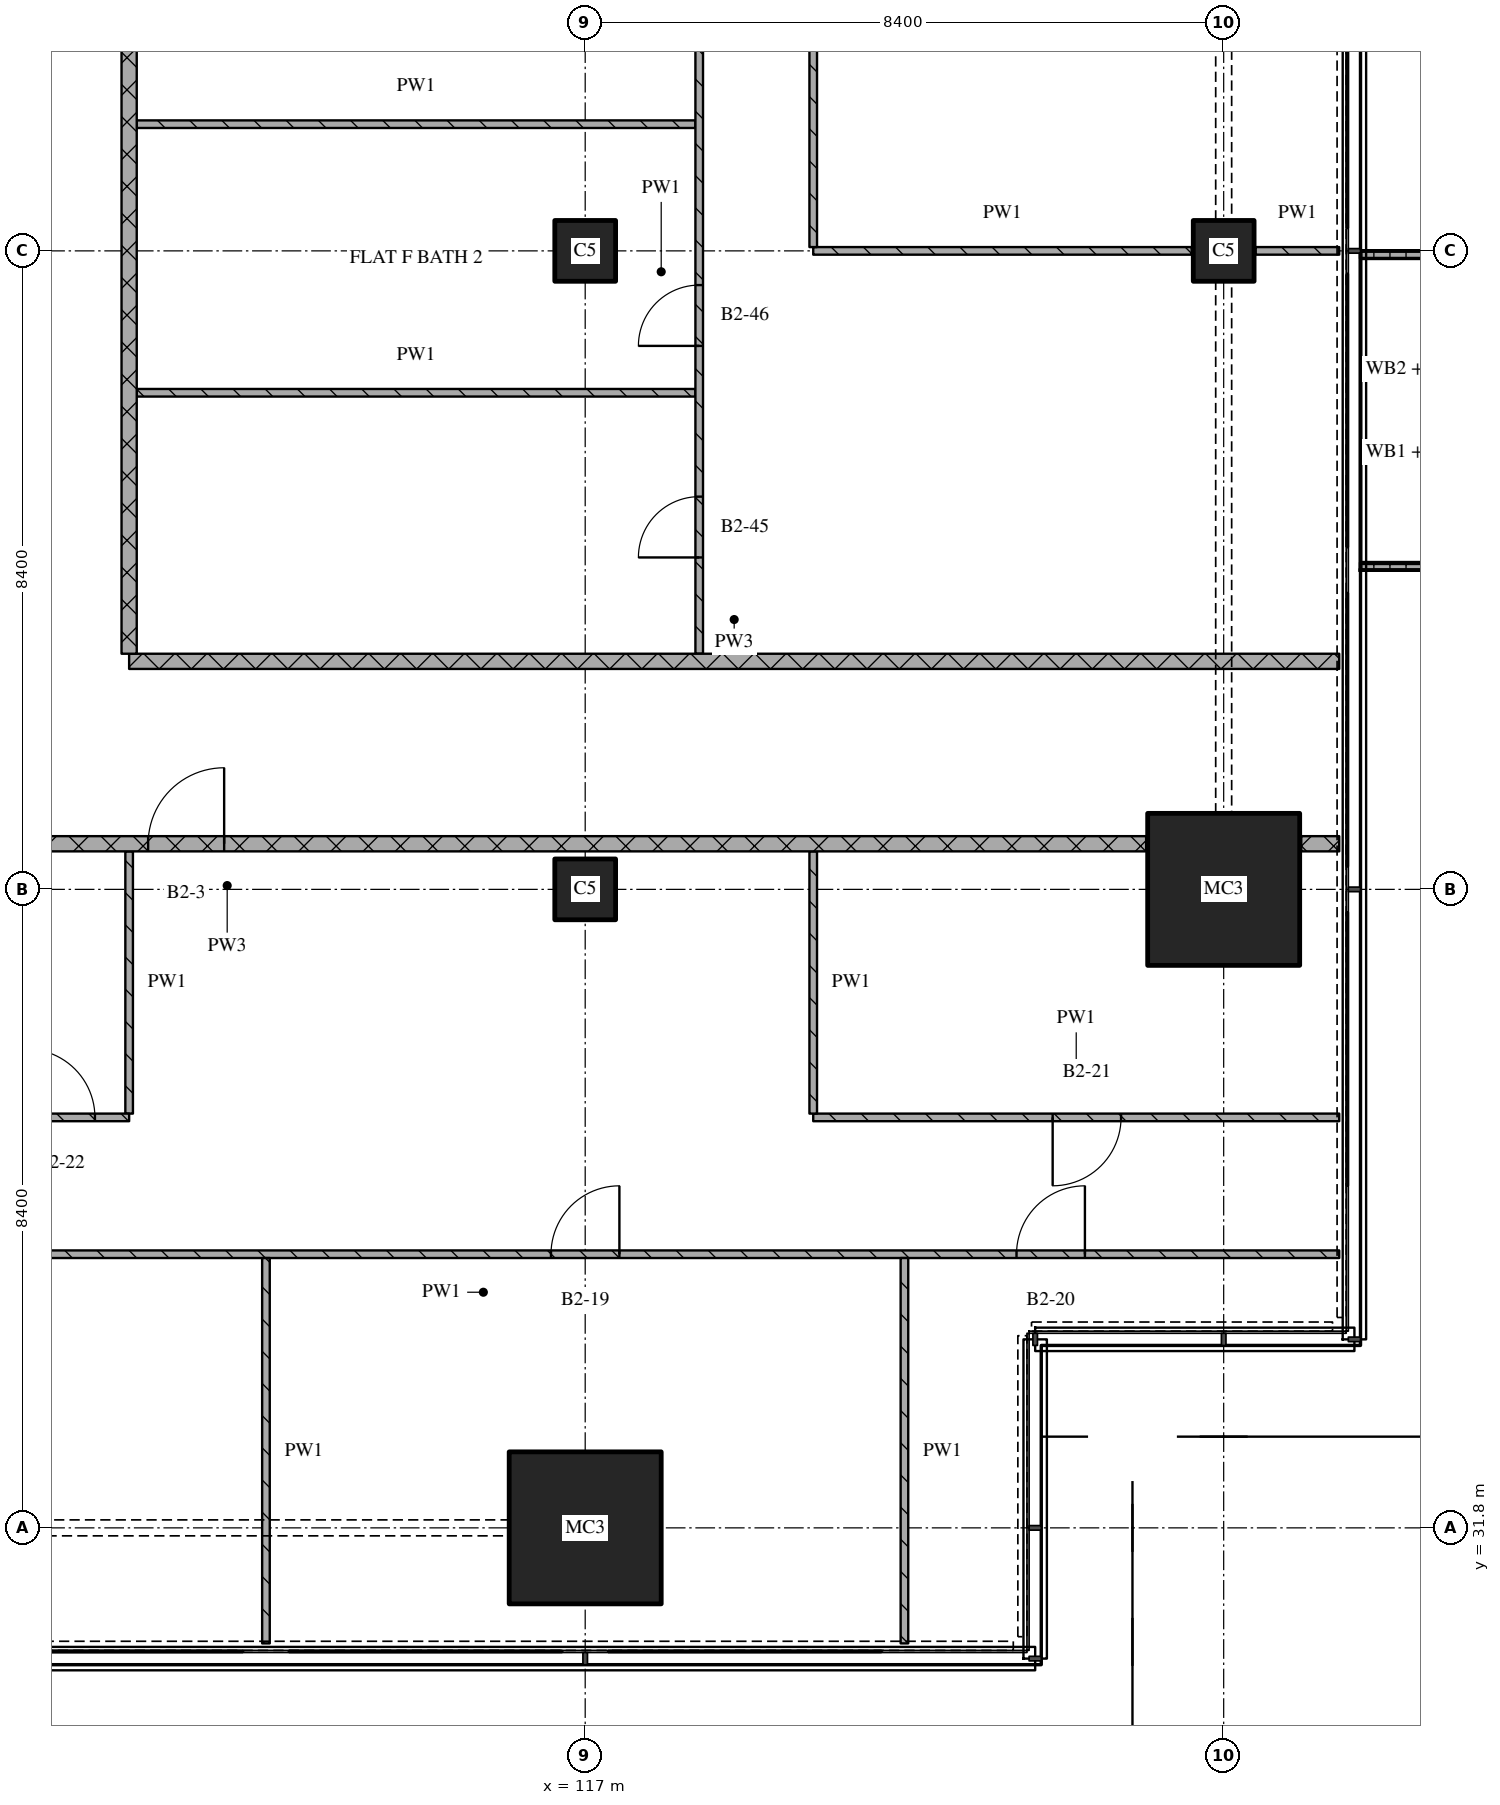
"""IFC4 building model, lengths in metres.
Left out: names, types, materials, properties, quantities, classifications, styles, units other than length and angle.
Written with IfcOpenShell. Run it as: python <this file> out.ifc"""

import sys

from ifc_helpers import new_model, si_unit, direction, frame, frame_2d, origin, origin_2d, place, context, subcontext, project, spatial, polyline, rectangle, outline, extrude, element, fill, save


model = new_model("IFC4")
c1 = context("Model", 3, precision=1e-05, world=origin(), true_north=direction((0.0, 1.0)))
c2 = subcontext(c1, "Body", "Model", "MODEL_VIEW")
j1 = project(units=[si_unit("LENGTHUNIT", "METRE"), si_unit("PLANEANGLEUNIT", "RADIAN")], contexts=[c1])
p1 = place(None, origin())
s1 = spatial("IfcSite", under=j1, at=p1, CompositionType="ELEMENT")
p2 = place(p1, origin())
s2 = spatial("IfcBuilding", under=s1, at=p2, CompositionType="ELEMENT")
p3 = place(p2, frame((0.0, 0.0, 106.05)))
s3 = spatial("IfcBuildingStorey", under=s2, at=p3, CompositionType="ELEMENT", Elevation=106.05)
p4 = place(p3, frame((117.0, 31.8, 0.0), z_axis=(0.0, 0.0, 1.0), x_axis=(1.0, 0.0, 0.0)))
e1 = element("IfcColumn", 1, at=p4, inside=s3, PredefinedType="COLUMN", context=c2, shape_type="SweptSolid", body=[
    extrude(rectangle(XDim=2.0, YDim=2.0, at=origin_2d()), origin(), (0.0, 0.0, 1.0), 3.6),
])
for number, where, z_axis, x_axis in (
    (2, (117.0, 40.2, 0.0), (0.0, 0.0, 1.0), (1.0, 0.0, 0.0)),
    (3, (117.0, 48.6, 0.0), (0.0, 0.0, 1.0), (1.0, 0.0, 0.0)),
):
    element("IfcColumn", number, at=place(p3, frame(where, z_axis=z_axis, x_axis=x_axis)), inside=s3, PredefinedType="COLUMN", context=c2, shape_type="SweptSolid", body=[
        extrude(rectangle(XDim=0.8, YDim=0.8, at=origin_2d()), origin(), (0.0, 0.0, 1.0), 3.6),
    ])
p5 = place(p3, frame((125.4, 40.2, 0.0), z_axis=(0.0, 0.0, 1.0), x_axis=(1.0, 0.0, 0.0)))
e4 = element("IfcColumn", 4, at=p5, inside=s3, PredefinedType="COLUMN", context=c2, shape_type="SweptSolid", body=[
    extrude(rectangle(XDim=2.0, YDim=2.0, at=origin_2d()), origin(), (0.0, 0.0, 1.0), 3.6),
])
p6 = place(p3, frame((125.4, 48.6, 0.0), z_axis=(0.0, 0.0, 1.0), x_axis=(1.0, 0.0, 0.0)))
e5 = element("IfcColumn", 5, at=p6, inside=s3, PredefinedType="COLUMN", context=c2, shape_type="SweptSolid", body=[
    extrude(rectangle(XDim=0.8, YDim=0.8, at=origin_2d()), origin(), (0.0, 0.0, 1.0), 3.6),
])
p7 = place(p3, origin())
e6 = element("IfcWall", 6, at=p7, inside=s3, PredefinedType="SOLIDWALL", context=c2, shape_type="SweptSolid", body=[
    extrude(outline(polyline([(127.2, 44.4), (127.2, 44.5), (128.833, 44.5), (128.833, 48.5), (127.2, 48.5), (127.2, 48.6), (128.933, 48.6), (128.933, 44.4), (127.2, 44.4)])), origin(), (0.0, 0.0, 1.0), 1.0),
])
p8 = place(p3, frame((126.92, 35.4, 0.0), z_axis=(0.0, 0.0, 1.0), x_axis=(-1.0, 0.0, 0.0)))
e7 = element("IfcWall", 7, at=p8, inside=s3, PredefinedType="PARTITIONING", context=c2, shape_type="SweptSolid", body=[
    extrude(rectangle(XDim=22.52, YDim=0.1, at=frame_2d((11.26, 0.0))), origin(), (0.0, 0.0, 1.0), 3.32),
])
p9 = place(p8, frame((3.346, 0.0, 0.0)))
e8 = element("IfcOpeningElement", 8, at=p9, cuts=e7, PredefinedType="OPENING", context=c2, shape_type="SweptSolid", body=[
    extrude(rectangle(XDim=0.9, YDim=2.1, at=frame_2d((0.45, 1.05))), frame((0.0, 0.06, 0.0), z_axis=(0.0, -1.0, 0.0), x_axis=(1.0, 0.0, 0.0)), (0.0, 0.0, 1.0), 0.12),
])
p10 = place(p8, frame((9.47, 0.0, 0.0)))
e9 = element("IfcOpeningElement", 9, at=p10, cuts=e7, PredefinedType="OPENING", context=c2, shape_type="SweptSolid", body=[
    extrude(rectangle(XDim=0.9, YDim=2.1, at=frame_2d((0.45, 1.05))), frame((0.0, 0.06, 0.0), z_axis=(0.0, -1.0, 0.0), x_axis=(1.0, 0.0, 0.0)), (0.0, 0.0, 1.0), 0.12),
])
p11 = place(p8, frame((17.87, 0.0, 0.0)))
e10 = element("IfcOpeningElement", 10, at=p11, cuts=e7, PredefinedType="OPENING", context=c2, shape_type="SweptSolid", body=[
    extrude(rectangle(XDim=0.9, YDim=2.1, at=frame_2d((0.45, 1.05))), frame((0.0, 0.06, 0.0), z_axis=(0.0, -1.0, 0.0), x_axis=(1.0, 0.0, 0.0)), (0.0, 0.0, 1.0), 0.12),
])
p12 = place(p3, frame((120.0, 37.2, 0.0), z_axis=(0.0, 0.0, 1.0), x_axis=(1.0, 0.0, 0.0)))
e11 = element("IfcWall", 11, at=p12, inside=s3, PredefinedType="PARTITIONING", context=c2, shape_type="SweptSolid", body=[
    extrude(rectangle(XDim=6.92, YDim=0.1, at=frame_2d((3.46, 0.0))), origin(), (0.0, 0.0, 1.0), 3.32),
])
p13 = place(p12, frame((3.15, 0.0, 0.0)))
e12 = element("IfcOpeningElement", 12, at=p13, cuts=e11, PredefinedType="OPENING", context=c2, shape_type="SweptSolid", body=[
    extrude(rectangle(XDim=0.9, YDim=2.1, at=frame_2d((0.45, 1.05))), frame((0.0, 0.06, 0.0), z_axis=(0.0, -1.0, 0.0), x_axis=(1.0, 0.0, 0.0)), (0.0, 0.0, 1.0), 0.12),
])
p14 = place(p3, frame((124.38, 40.8, 0.0), z_axis=(0.0, 0.0, 1.0), x_axis=(-1.0, 0.0, 0.0)))
e13 = element("IfcWall", 13, at=p14, inside=s3, PredefinedType="PARTITIONING", context=c2, shape_type="SweptSolid", body=[
    extrude(rectangle(XDim=24.18, YDim=0.2, at=frame_2d((12.09, 0.0))), origin(), (0.0, 0.0, 1.0), 3.32),
])
p15 = place(p14, frame((12.13, 0.0, 0.0)))
e14 = element("IfcOpeningElement", 14, at=p15, cuts=e13, PredefinedType="OPENING", context=c2, shape_type="SweptSolid", body=[
    extrude(rectangle(XDim=1.0, YDim=2.1, at=frame_2d((0.5, 1.05))), frame((0.0, 0.11, 0.0), z_axis=(0.0, -1.0, 0.0), x_axis=(1.0, 0.0, 0.0)), (0.0, 0.0, 1.0), 0.22),
])
p16 = place(p3, frame((126.42, 40.8, 0.0), z_axis=(0.0, 0.0, 1.0), x_axis=(1.0, 0.0, 0.0)))
e15 = element("IfcWall", 15, at=p16, inside=s3, PredefinedType="PARTITIONING", context=c2, shape_type="SweptSolid", body=[
    extrude(rectangle(XDim=0.5, YDim=0.2, at=frame_2d((0.25, 0.0))), origin(), (0.0, 0.0, 1.0), 3.32),
])
p17 = place(p3, frame((111.0, 43.2, 0.0), z_axis=(0.0, 0.0, 1.0), x_axis=(1.0, 0.0, 0.0)))
e16 = element("IfcWall", 16, at=p17, inside=s3, PredefinedType="PARTITIONING", context=c2, shape_type="SweptSolid", body=[
    extrude(rectangle(XDim=15.92, YDim=0.2, at=frame_2d((7.96, 0.0))), origin(), (0.0, 0.0, 1.0), 3.32),
])
p18 = place(p3, frame((111.1, 46.733, 0.0), z_axis=(0.0, 0.0, 1.0), x_axis=(1.0, 0.0, 0.0)))
e17 = element("IfcWall", 17, at=p18, inside=s3, PredefinedType="PARTITIONING", context=c2, shape_type="SweptSolid", body=[
    extrude(rectangle(XDim=7.35, YDim=0.1, at=frame_2d((3.675, 0.0))), origin(), (0.0, 0.0, 1.0), 3.32),
])
p19 = place(p3, frame((120.0, 48.6, 0.0), z_axis=(0.0, 0.0, 1.0), x_axis=(1.0, 0.0, 0.0)))
e18 = element("IfcWall", 18, at=p19, inside=s3, PredefinedType="PARTITIONING", context=c2, shape_type="SweptSolid", body=[
    extrude(rectangle(XDim=4.98, YDim=0.1, at=frame_2d((2.49, 0.0))), origin(), (0.0, 0.0, 1.0), 3.32),
])
p20 = place(p3, frame((125.82, 48.6, 0.0), z_axis=(0.0, 0.0, 1.0), x_axis=(1.0, 0.0, 0.0)))
e19 = element("IfcWall", 19, at=p20, inside=s3, PredefinedType="PARTITIONING", context=c2, shape_type="SweptSolid", body=[
    extrude(rectangle(XDim=1.1, YDim=0.1, at=frame_2d((0.55, 0.0))), origin(), (0.0, 0.0, 1.0), 3.32),
])
p21 = place(p3, frame((111.1, 50.267, 0.0), z_axis=(0.0, 0.0, 1.0), x_axis=(1.0, 0.0, 0.0)))
e20 = element("IfcWall", 20, at=p21, inside=s3, PredefinedType="PARTITIONING", context=c2, shape_type="SweptSolid", body=[
    extrude(rectangle(XDim=7.35, YDim=0.1, at=frame_2d((3.675, 0.0))), origin(), (0.0, 0.0, 1.0), 3.32),
])
p22 = place(p3, frame((111.0, 75.32, 0.0), z_axis=(0.0, 0.0, 1.0), x_axis=(0.0, -1.0, 0.0)))
e21 = element("IfcWall", 21, at=p22, inside=s3, PredefinedType="PARTITIONING", context=c2, shape_type="SweptSolid", body=[
    extrude(rectangle(XDim=32.02, YDim=0.2, at=frame_2d((16.01, 0.0))), origin(), (0.0, 0.0, 1.0), 3.32),
])
p23 = place(p22, frame((3.87, 0.0, 0.0)))
e22 = element("IfcOpeningElement", 22, at=p23, cuts=e21, PredefinedType="OPENING", context=c2, shape_type="SweptSolid", body=[
    extrude(rectangle(XDim=1.0, YDim=2.1, at=frame_2d((0.5, 1.05))), frame((0.0, 0.11, 0.0), z_axis=(0.0, -1.0, 0.0), x_axis=(1.0, 0.0, 0.0)), (0.0, 0.0, 1.0), 0.22),
])
p24 = place(p22, frame((20.67, 0.0, 0.0)))
e23 = element("IfcOpeningElement", 23, at=p24, cuts=e21, PredefinedType="OPENING", context=c2, shape_type="SweptSolid", body=[
    extrude(rectangle(XDim=1.0, YDim=2.1, at=frame_2d((0.5, 1.05))), frame((0.0, 0.11, 0.0), z_axis=(0.0, -1.0, 0.0), x_axis=(1.0, 0.0, 0.0)), (0.0, 0.0, 1.0), 0.22),
])
p25 = place(p3, frame((111.0, 40.7, 0.0), z_axis=(0.0, 0.0, 1.0), x_axis=(0.0, -1.0, 0.0)))
e24 = element("IfcWall", 24, at=p25, inside=s3, PredefinedType="PARTITIONING", context=c2, shape_type="SweptSolid", body=[
    extrude(rectangle(XDim=3.45, YDim=0.1, at=frame_2d((1.725, 0.0))), origin(), (0.0, 0.0, 1.0), 3.32),
])
p26 = place(p3, frame((112.8, 35.35, 0.0), z_axis=(0.0, 0.0, 1.0), x_axis=(0.0, -1.0, 0.0)))
e25 = element("IfcWall", 25, at=p26, inside=s3, PredefinedType="PARTITIONING", context=c2, shape_type="SweptSolid", body=[
    extrude(rectangle(XDim=5.07, YDim=0.1, at=frame_2d((2.535, 0.0))), origin(), (0.0, 0.0, 1.0), 3.32),
])
p27 = place(p3, frame((118.5, 43.3, 0.0), z_axis=(0.0, 0.0, 1.0), x_axis=(0.0, 1.0, 0.0)))
e26 = element("IfcWall", 26, at=p27, inside=s3, PredefinedType="PARTITIONING", context=c2, shape_type="SweptSolid", body=[
    extrude(rectangle(XDim=10.05, YDim=0.1, at=frame_2d((5.025, 0.0))), origin(), (0.0, 0.0, 1.0), 3.32),
])
p28 = place(p27, frame((1.267, 0.0, 0.0)))
e27 = element("IfcOpeningElement", 27, at=p28, cuts=e26, PredefinedType="OPENING", context=c2, shape_type="SweptSolid", body=[
    extrude(rectangle(XDim=0.8, YDim=2.1, at=frame_2d((0.4, 1.05))), frame((0.0, 0.06, 0.0), z_axis=(0.0, -1.0, 0.0), x_axis=(1.0, 0.0, 0.0)), (0.0, 0.0, 1.0), 0.12),
])
p29 = place(p27, frame((4.05, 0.0, 0.0)))
e28 = element("IfcOpeningElement", 28, at=p29, cuts=e26, PredefinedType="OPENING", context=c2, shape_type="SweptSolid", body=[
    extrude(rectangle(XDim=0.8, YDim=2.1, at=frame_2d((0.4, 1.05))), frame((0.0, 0.06, 0.0), z_axis=(0.0, -1.0, 0.0), x_axis=(1.0, 0.0, 0.0)), (0.0, 0.0, 1.0), 0.12),
])
p30 = place(p27, frame((8.083, 0.0, 0.0)))
e29 = element("IfcOpeningElement", 29, at=p30, cuts=e26, PredefinedType="OPENING", context=c2, shape_type="SweptSolid", body=[
    extrude(rectangle(XDim=0.9, YDim=2.1, at=frame_2d((0.45, 1.05))), frame((0.0, 0.06, 0.0), z_axis=(0.0, -1.0, 0.0), x_axis=(1.0, 0.0, 0.0)), (0.0, 0.0, 1.0), 0.12),
])
p31 = place(p3, frame((120.0, 40.7, 0.0), z_axis=(0.0, 0.0, 1.0), x_axis=(0.0, -1.0, 0.0)))
e30 = element("IfcWall", 30, at=p31, inside=s3, PredefinedType="PARTITIONING", context=c2, shape_type="SweptSolid", body=[
    extrude(rectangle(XDim=3.45, YDim=0.1, at=frame_2d((1.725, 0.0))), origin(), (0.0, 0.0, 1.0), 3.32),
])
p32 = place(p3, frame((120.0, 65.3, 0.0), z_axis=(0.0, 0.0, 1.0), x_axis=(0.0, -1.0, 0.0)))
e31 = element("IfcWall", 31, at=p32, inside=s3, PredefinedType="PARTITIONING", context=c2, shape_type="SweptSolid", body=[
    extrude(rectangle(XDim=16.65, YDim=0.1, at=frame_2d((8.325, 0.0))), origin(), (0.0, 0.0, 1.0), 3.32),
])
p33 = place(p32, frame((3.65, 0.0, 0.0)))
e32 = element("IfcOpeningElement", 32, at=p33, cuts=e31, PredefinedType="OPENING", context=c2, shape_type="SweptSolid", body=[
    extrude(rectangle(XDim=0.9, YDim=2.1, at=frame_2d((0.45, 1.05))), frame((0.0, 0.06, 0.0), z_axis=(0.0, -1.0, 0.0), x_axis=(1.0, 0.0, 0.0)), (0.0, 0.0, 1.0), 0.12),
])
p34 = place(p32, frame((12.05, 0.0, 0.0)))
e33 = element("IfcOpeningElement", 33, at=p34, cuts=e31, PredefinedType="OPENING", context=c2, shape_type="SweptSolid", body=[
    extrude(rectangle(XDim=0.9, YDim=2.1, at=frame_2d((0.45, 1.05))), frame((0.0, 0.06, 0.0), z_axis=(0.0, -1.0, 0.0), x_axis=(1.0, 0.0, 0.0)), (0.0, 0.0, 1.0), 0.12),
])
p35 = place(p3, frame((121.2, 35.35, 0.0), z_axis=(0.0, 0.0, 1.0), x_axis=(0.0, -1.0, 0.0)))
e34 = element("IfcWall", 34, at=p35, inside=s3, PredefinedType="PARTITIONING", context=c2, shape_type="SweptSolid", body=[
    extrude(rectangle(XDim=5.07, YDim=0.1, at=frame_2d((2.535, 0.0))), origin(), (0.0, 0.0, 1.0), 3.32),
])
p36 = place(p3, frame((100.3, 37.2, 0.0), z_axis=(0.0, 0.0, 1.0), x_axis=(1.0, 0.0, 0.0)))
e35 = element("IfcWall", 35, at=p36, inside=s3, PredefinedType="PARTITIONING", context=c2, shape_type="SweptSolid", body=[
    extrude(rectangle(XDim=10.7, YDim=0.1, at=frame_2d((5.35, 0.0))), origin(), (0.0, 0.0, 1.0), 3.32),
])
p37 = place(p36, frame((1.75, 0.0, 0.0)))
e36 = element("IfcOpeningElement", 36, at=p37, cuts=e35, PredefinedType="OPENING", context=c2, shape_type="SweptSolid", body=[
    extrude(rectangle(XDim=0.8, YDim=2.1, at=frame_2d((0.4, 1.05))), frame((0.0, 0.06, 0.0), z_axis=(0.0, -1.0, 0.0), x_axis=(1.0, 0.0, 0.0)), (0.0, 0.0, 1.0), 0.12),
])
p38 = place(p36, frame((6.25, 0.0, 0.0)))
e37 = element("IfcOpeningElement", 37, at=p38, cuts=e35, PredefinedType="OPENING", context=c2, shape_type="SweptSolid", body=[
    extrude(rectangle(XDim=0.8, YDim=2.1, at=frame_2d((0.4, 1.05))), frame((0.0, 0.06, 0.0), z_axis=(0.0, -1.0, 0.0), x_axis=(1.0, 0.0, 0.0)), (0.0, 0.0, 1.0), 0.12),
])
p39 = place(p36, frame((9.35, 0.0, 0.0)))
e38 = element("IfcOpeningElement", 38, at=p39, cuts=e35, PredefinedType="OPENING", context=c2, shape_type="SweptSolid", body=[
    extrude(rectangle(XDim=0.9, YDim=2.1, at=frame_2d((0.45, 1.05))), frame((0.0, 0.06, 0.0), z_axis=(0.0, -1.0, 0.0), x_axis=(1.0, 0.0, 0.0)), (0.0, 0.0, 1.0), 0.12),
])
p40 = place(p9, origin())
e39 = element("IfcDoor", 39, at=p40, inside=s3, OperationType="SINGLE_SWING_RIGHT", PredefinedType="DOOR", context=c2, shape_type="SweptSolid", body=[
    extrude(rectangle(XDim=0.9, YDim=2.1, at=frame_2d((0.45, 1.05))), frame((0.0, 0.025, 0.0), z_axis=(0.0, -1.0, 0.0), x_axis=(1.0, 0.0, 0.0)), (0.0, 0.0, 1.0), 0.05),
])
fill(e8, e39)
p41 = place(p10, origin())
e40 = element("IfcDoor", 40, at=p41, inside=s3, OperationType="SINGLE_SWING_RIGHT", PredefinedType="DOOR", context=c2, shape_type="SweptSolid", body=[
    extrude(rectangle(XDim=0.9, YDim=2.1, at=frame_2d((0.45, 1.05))), frame((0.0, 0.025, 0.0), z_axis=(0.0, -1.0, 0.0), x_axis=(1.0, 0.0, 0.0)), (0.0, 0.0, 1.0), 0.05),
])
fill(e9, e40)
p42 = place(p13, origin())
e41 = element("IfcDoor", 41, at=p42, inside=s3, OperationType="SINGLE_SWING_RIGHT", PredefinedType="DOOR", context=c2, shape_type="SweptSolid", body=[
    extrude(rectangle(XDim=0.9, YDim=2.1, at=frame_2d((0.45, 1.05))), frame((0.0, 0.025, 0.0), z_axis=(0.0, -1.0, 0.0), x_axis=(1.0, 0.0, 0.0)), (0.0, 0.0, 1.0), 0.05),
])
fill(e12, e41)
p43 = place(p15, origin())
e42 = element("IfcDoor", 42, at=p43, inside=s3, OperationType="SINGLE_SWING_RIGHT", PredefinedType="DOOR", context=c2, shape_type="SweptSolid", body=[
    extrude(rectangle(XDim=1.0, YDim=2.1, at=frame_2d((0.5, 1.05))), frame((0.0, 0.025, 0.0), z_axis=(0.0, -1.0, 0.0), x_axis=(1.0, 0.0, 0.0)), (0.0, 0.0, 1.0), 0.05),
])
fill(e14, e42)
p44 = place(p28, origin())
e43 = element("IfcDoor", 43, at=p44, inside=s3, OperationType="SINGLE_SWING_LEFT", PredefinedType="DOOR", context=c2, shape_type="SweptSolid", body=[
    extrude(rectangle(XDim=0.8, YDim=2.1, at=frame_2d((0.4, 1.05))), frame((0.0, 0.025, 0.0), z_axis=(0.0, -1.0, 0.0), x_axis=(1.0, 0.0, 0.0)), (0.0, 0.0, 1.0), 0.05),
])
fill(e27, e43)
p45 = place(p29, origin())
e44 = element("IfcDoor", 44, at=p45, inside=s3, OperationType="SINGLE_SWING_LEFT", PredefinedType="DOOR", context=c2, shape_type="SweptSolid", body=[
    extrude(rectangle(XDim=0.8, YDim=2.1, at=frame_2d((0.4, 1.05))), frame((0.0, 0.025, 0.0), z_axis=(0.0, -1.0, 0.0), x_axis=(1.0, 0.0, 0.0)), (0.0, 0.0, 1.0), 0.05),
])
fill(e28, e44)
p46 = place(p39, origin())
e45 = element("IfcDoor", 45, at=p46, inside=s3, OperationType="SINGLE_SWING_LEFT", PredefinedType="DOOR", context=c2, shape_type="SweptSolid", body=[
    extrude(rectangle(XDim=0.9, YDim=2.1, at=frame_2d((0.45, 1.05))), frame((0.0, 0.025, 0.0), z_axis=(0.0, -1.0, 0.0), x_axis=(1.0, 0.0, 0.0)), (0.0, 0.0, 1.0), 0.05),
])
fill(e38, e45)
save(model, sys.argv[1])
